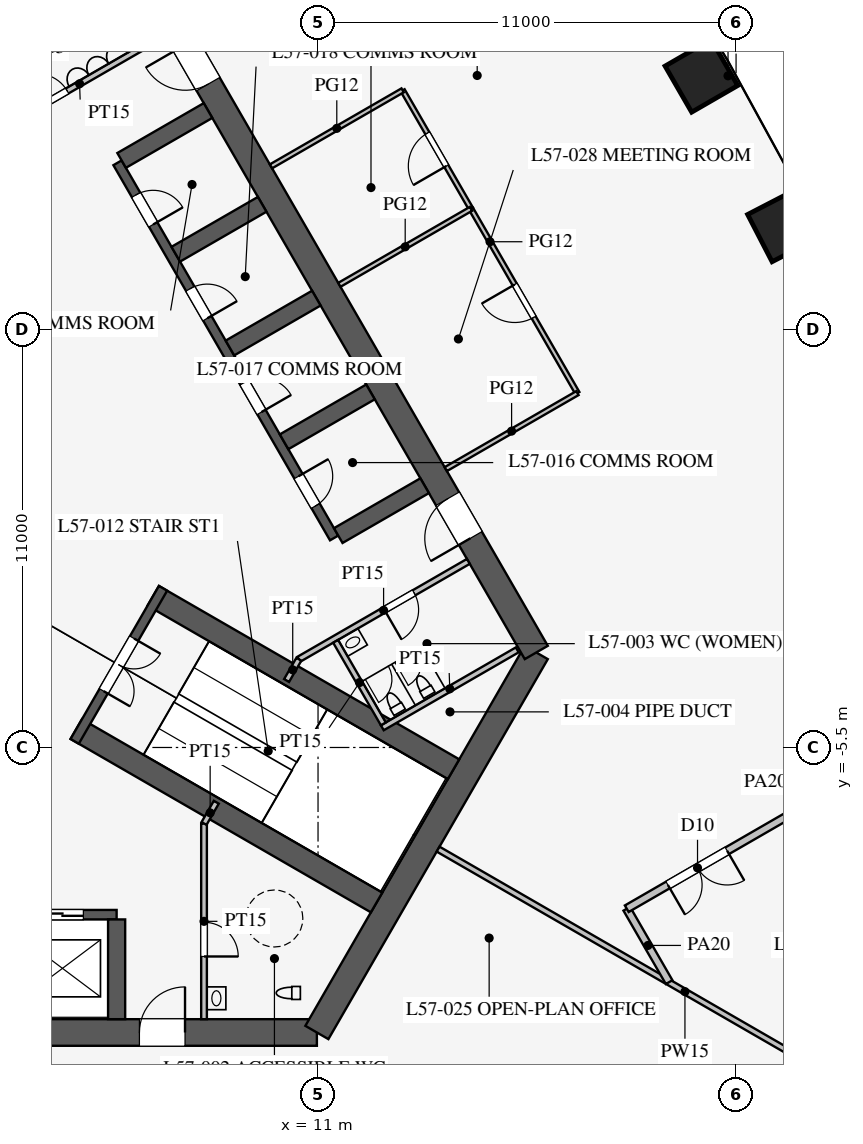
"""IFC4 building model, lengths in metres.
Left out: names, types, materials, properties, quantities, classifications, styles, units other than length and angle.
Written with IfcOpenShell. Run it as: python <this file> out.ifc"""

import sys

from ifc_helpers import new_model, si_unit, direction, frame, frame_2d, origin, origin_2d, place, context, subcontext, project, spatial, rectangle, extrude, element, fill, save


model = new_model("IFC4")
c1 = context("Model", 3, precision=1e-05, world=origin(), true_north=direction((0.0, 1.0)))
c2 = subcontext(c1, "Body", "Model", "MODEL_VIEW")
j1 = project(units=[si_unit("LENGTHUNIT", "METRE"), si_unit("PLANEANGLEUNIT", "RADIAN")], contexts=[c1])
p1 = place(None, origin())
s1 = spatial("IfcSite", under=j1, at=p1, CompositionType="ELEMENT")
p2 = place(p1, origin())
s2 = spatial("IfcBuilding", under=s1, at=p2, CompositionType="ELEMENT")
p3 = place(p2, frame((0.0, 0.0, 248.5)))
s3 = spatial("IfcBuildingStorey", under=s2, at=p3, CompositionType="ELEMENT", Elevation=248.5)
for number, where, z_axis, x_axis in (
    (1, (23.248, 8.226, 0.0), (0.0, 0.0, 1.0), (-0.46, 0.888, 0.0)),
    (2, (21.088, 12.175, 0.0), (0.0, 0.0, 1.0), (-0.5, 0.866, 0.0)),
):
    element("IfcColumn", number, at=place(p3, frame(where, z_axis=z_axis, x_axis=x_axis)), inside=s3, PredefinedType="COLUMN", context=c2, shape_type="SweptSolid", body=[
        extrude(rectangle(XDim=1.4, YDim=1.4, at=origin_2d()), origin(), (0.0, 0.0, 1.0), 4.2),
    ])
p4 = place(p3, frame((-10.97, -13.0, 0.0), z_axis=(0.0, 0.0, 1.0), x_axis=(1.0, 0.0, 0.0)))
e3 = element("IfcWall", 3, at=p4, inside=s3, PredefinedType="SHEAR", context=c2, shape_type="SweptSolid", body=[
    extrude(rectangle(XDim=21.939, YDim=0.7, at=frame_2d((10.97, 0.0))), origin(), (0.0, 0.0, 1.0), 4.2),
])
p5 = place(p4, frame((17.27, 0.0, 0.0)))
e4 = element("IfcOpeningElement", 4, at=p5, cuts=e3, PredefinedType="OPENING", context=c2, shape_type="SweptSolid", body=[
    extrude(rectangle(XDim=1.2, YDim=2.1, at=frame_2d((0.6, 1.05))), frame((0.0, 0.36, 0.0), z_axis=(0.0, -1.0, 0.0), x_axis=(1.0, 0.0, 0.0)), (0.0, 0.0, 1.0), 0.72),
])
p6 = place(p4, frame((3.47, 0.0, 0.0)))
e5 = element("IfcOpeningElement", 5, at=p6, cuts=e3, PredefinedType="OPENING", context=c2, shape_type="SweptSolid", body=[
    extrude(rectangle(XDim=1.2, YDim=2.1, at=frame_2d((0.6, 1.05))), frame((0.0, 0.36, 0.0), z_axis=(0.0, -1.0, 0.0), x_axis=(1.0, 0.0, 0.0)), (0.0, 0.0, 1.0), 0.72),
])
p7 = place(p3, frame((10.97, -13.0, 0.0), z_axis=(0.0, 0.0, 1.0), x_axis=(0.499995765644, 0.866027848477, 0.0)))
e6 = element("IfcWall", 6, at=p7, inside=s3, PredefinedType="SHEAR", context=c2, shape_type="SweptSolid", body=[
    extrude(rectangle(XDim=11.547, YDim=0.7, at=frame_2d((5.773, 0.0))), origin(), (0.0, 0.0, 1.0), 4.2),
])
p8 = place(p3, frame((16.743, -3.0, 0.0), z_axis=(0.0, 0.0, 1.0), x_axis=(-0.500002442456, 0.866023993627, 0.0)))
e7 = element("IfcWall", 7, at=p8, inside=s3, PredefinedType="SHEAR", context=c2, shape_type="SweptSolid", body=[
    extrude(rectangle(XDim=21.939, YDim=0.7, at=frame_2d((10.97, 0.0))), origin(), (0.0, 0.0, 1.0), 4.2),
])
p9 = place(p8, frame((17.27, 0.0, 0.0)))
e8 = element("IfcOpeningElement", 8, at=p9, cuts=e7, PredefinedType="OPENING", context=c2, shape_type="SweptSolid", body=[
    extrude(rectangle(XDim=1.2, YDim=2.1, at=frame_2d((0.6, 1.05))), frame((0.0, 0.36, 0.0), z_axis=(0.0, -1.0, 0.0), x_axis=(1.0, 0.0, 0.0)), (0.0, 0.0, 1.0), 0.72),
])
p10 = place(p8, frame((3.47, 0.0, 0.0)))
e9 = element("IfcOpeningElement", 9, at=p10, cuts=e7, PredefinedType="OPENING", context=c2, shape_type="SweptSolid", body=[
    extrude(rectangle(XDim=1.2, YDim=2.1, at=frame_2d((0.6, 1.05))), frame((0.0, 0.36, 0.0), z_axis=(0.0, -1.0, 0.0), x_axis=(1.0, 0.0, 0.0)), (0.0, 0.0, 1.0), 0.72),
])
p11 = place(p3, frame((-5.7, -9.9, 0.0), z_axis=(0.0, 0.0, 1.0), x_axis=(1.0, 0.0, 0.0)))
e10 = element("IfcWall", 10, at=p11, inside=s3, PredefinedType="SHEAR", context=c2, shape_type="SweptSolid", body=[
    extrude(rectangle(XDim=11.4, YDim=0.25, at=frame_2d((5.7, 0.0))), origin(), (0.0, 0.0, 1.0), 4.2),
])
p12 = place(p11, frame((0.875, 0.0, 0.0)))
e11 = element("IfcOpeningElement", 11, at=p12, cuts=e10, PredefinedType="OPENING", context=c2, shape_type="SweptSolid", body=[
    extrude(rectangle(XDim=1.1, YDim=2.2, at=frame_2d((0.55, 1.1))), frame((0.0, 0.135, 0.0), z_axis=(0.0, -1.0, 0.0), x_axis=(1.0, 0.0, 0.0)), (0.0, 0.0, 1.0), 0.27),
])
p13 = place(p11, frame((3.725, 0.0, 0.0)))
e12 = element("IfcOpeningElement", 12, at=p13, cuts=e10, PredefinedType="OPENING", context=c2, shape_type="SweptSolid", body=[
    extrude(rectangle(XDim=1.1, YDim=2.2, at=frame_2d((0.55, 1.1))), frame((0.0, 0.135, 0.0), z_axis=(0.0, -1.0, 0.0), x_axis=(1.0, 0.0, 0.0)), (0.0, 0.0, 1.0), 0.27),
])
p14 = place(p11, frame((6.575, 0.0, 0.0)))
e13 = element("IfcOpeningElement", 13, at=p14, cuts=e10, PredefinedType="OPENING", context=c2, shape_type="SweptSolid", body=[
    extrude(rectangle(XDim=1.1, YDim=2.2, at=frame_2d((0.55, 1.1))), frame((0.0, 0.135, 0.0), z_axis=(0.0, -1.0, 0.0), x_axis=(1.0, 0.0, 0.0)), (0.0, 0.0, 1.0), 0.27),
])
p15 = place(p11, frame((9.425, 0.0, 0.0)))
e14 = element("IfcOpeningElement", 14, at=p15, cuts=e10, PredefinedType="OPENING", context=c2, shape_type="SweptSolid", body=[
    extrude(rectangle(XDim=1.1, YDim=2.2, at=frame_2d((0.55, 1.1))), frame((0.0, 0.135, 0.0), z_axis=(0.0, -1.0, 0.0), x_axis=(1.0, 0.0, 0.0)), (0.0, 0.0, 1.0), 0.27),
])
p16 = place(p3, frame((5.7, -10.025, 0.0), z_axis=(0.0, 0.0, 1.0), x_axis=(0.0, -1.0, 0.0)))
e15 = element("IfcWall", 15, at=p16, inside=s3, PredefinedType="SHEAR", context=c2, shape_type="SweptSolid", body=[
    extrude(rectangle(XDim=2.625, YDim=0.45, at=frame_2d((1.312, 0.0))), origin(), (0.0, 0.0, 1.0), 4.2),
])
p17 = place(p3, frame((11.424, 0.014, 0.0), z_axis=(0.0, 0.0, 1.0), x_axis=(-0.500001763848, 0.866024385424, 0.0)))
e16 = element("IfcWall", 16, at=p17, inside=s3, PredefinedType="SHEAR", context=c2, shape_type="SweptSolid", body=[
    extrude(rectangle(XDim=11.4, YDim=0.25, at=frame_2d((5.7, 0.0))), origin(), (0.0, 0.0, 1.0), 4.2),
])
p18 = place(p17, frame((0.975, 0.0, 0.0)))
e17 = element("IfcOpeningElement", 17, at=p18, cuts=e16, PredefinedType="OPENING", context=c2, shape_type="SweptSolid", body=[
    extrude(rectangle(XDim=0.9, YDim=2.1, at=frame_2d((0.45, 1.05))), frame((0.0, 0.135, 0.0), z_axis=(0.0, -1.0, 0.0), x_axis=(1.0, 0.0, 0.0)), (0.0, 0.0, 1.0), 0.27),
])
p19 = place(p17, frame((3.825, 0.0, 0.0)))
e18 = element("IfcOpeningElement", 18, at=p19, cuts=e16, PredefinedType="OPENING", context=c2, shape_type="SweptSolid", body=[
    extrude(rectangle(XDim=0.9, YDim=2.1, at=frame_2d((0.45, 1.05))), frame((0.0, 0.135, 0.0), z_axis=(0.0, -1.0, 0.0), x_axis=(1.0, 0.0, 0.0)), (0.0, 0.0, 1.0), 0.27),
])
p20 = place(p17, frame((6.675, 0.0, 0.0)))
e19 = element("IfcOpeningElement", 19, at=p20, cuts=e16, PredefinedType="OPENING", context=c2, shape_type="SweptSolid", body=[
    extrude(rectangle(XDim=0.9, YDim=2.1, at=frame_2d((0.45, 1.05))), frame((0.0, 0.135, 0.0), z_axis=(0.0, -1.0, 0.0), x_axis=(1.0, 0.0, 0.0)), (0.0, 0.0, 1.0), 0.27),
])
p21 = place(p17, frame((9.525, 0.0, 0.0)))
e20 = element("IfcOpeningElement", 20, at=p21, cuts=e16, PredefinedType="OPENING", context=c2, shape_type="SweptSolid", body=[
    extrude(rectangle(XDim=0.9, YDim=2.1, at=frame_2d((0.45, 1.05))), frame((0.0, 0.135, 0.0), z_axis=(0.0, -1.0, 0.0), x_axis=(1.0, 0.0, 0.0)), (0.0, 0.0, 1.0), 0.27),
])
for number, where, z_axis, x_axis in (
    (21, (11.532, 0.076, 0.0), (0.0, 0.0, 1.0), (0.866, 0.5, 0.0)),
    (22, (10.107, 2.544, 0.0), (0.0, 0.0, 1.0), (0.866, 0.5, 0.0)),
    (23, (8.682, 5.012, 0.0), (0.0, 0.0, 1.0), (0.866, 0.5, 0.0)),
    (24, (7.257, 7.481, 0.0), (0.0, 0.0, 1.0), (0.866, 0.5, 0.0)),
    (25, (5.832, 9.949, 0.0), (0.0, 0.0, 1.0), (0.866, 0.5, 0.0)),
):
    element("IfcWall", number, at=place(p3, frame(where, z_axis=z_axis, x_axis=x_axis)), inside=s3, PredefinedType="SHEAR", context=c2, shape_type="SweptSolid", body=[
        extrude(rectangle(XDim=2.625, YDim=0.45, at=frame_2d((1.312, 0.0))), origin(), (0.0, 0.0, 1.0), 4.2),
    ])
for number, where, z_axis, x_axis in (
    (26, (4.638, -5.016, 0.0), (0.0, 0.0, 1.0), (0.866, -0.5, 0.0)),
    (27, (6.663, -1.509, 0.0), (0.0, 0.0, 1.0), (0.866, -0.5, 0.0)),
):
    element("IfcWall", number, at=place(p3, frame(where, z_axis=z_axis, x_axis=x_axis)), inside=s3, PredefinedType="SHEAR", context=c2, shape_type="SweptSolid", body=[
        extrude(rectangle(XDim=9.125, YDim=0.6, at=frame_2d((4.562, 0.0))), origin(), (0.0, 0.0, 1.0), 4.2),
    ])
p22 = place(p3, frame((4.597, -5.339, 0.0), z_axis=(0.0, 0.0, 1.0), x_axis=(0.499984536904, 0.866034331223, 0.0)))
e28 = element("IfcWall", 28, at=p22, inside=s3, PredefinedType="SHEAR", context=c2, shape_type="SweptSolid", body=[
    extrude(rectangle(XDim=4.65, YDim=0.25, at=frame_2d((2.325, 0.0))), origin(), (0.0, 0.0, 1.0), 4.2),
])
p23 = place(p22, frame((1.525, 0.0, 0.0)))
e29 = element("IfcOpeningElement", 29, at=p23, cuts=e28, PredefinedType="OPENING", context=c2, shape_type="SweptSolid", body=[
    extrude(rectangle(XDim=1.6, YDim=2.1, at=frame_2d((0.8, 1.05))), frame((0.0, 0.135, 0.0), z_axis=(0.0, -1.0, 0.0), x_axis=(1.0, 0.0, 0.0)), (0.0, 0.0, 1.0), 0.27),
])
p24 = place(p3, frame((8.0, -7.5, 0.0), z_axis=(0.0, 0.0, 1.0), x_axis=(0.0, -1.0, 0.0)))
e30 = element("IfcWall", 30, at=p24, inside=s3, PredefinedType="PARTITIONING", context=c2, shape_type="SweptSolid", body=[
    extrude(rectangle(XDim=5.15, YDim=0.15, at=frame_2d((2.575, 0.0))), origin(), (0.0, 0.0, 1.0), 4.0),
])
p25 = place(p24, frame((2.6, 0.0, 0.0)))
e31 = element("IfcOpeningElement", 31, at=p25, cuts=e30, PredefinedType="OPENING", context=c2, shape_type="SweptSolid", body=[
    extrude(rectangle(XDim=0.9, YDim=2.1, at=frame_2d((0.45, 1.05))), frame((0.0, 0.085, 0.0), z_axis=(0.0, -1.0, 0.0), x_axis=(1.0, 0.0, 0.0)), (0.0, 0.0, 1.0), 0.17),
])
p26 = place(p3, frame((2.495, 10.678, 0.0), z_axis=(0.0, 0.0, 1.0), x_axis=(0.866037967349, 0.499978238636, 0.0)))
e32 = element("IfcWall", 32, at=p26, inside=s3, PredefinedType="PARTITIONING", context=c2, shape_type="SweptSolid", body=[
    extrude(rectangle(XDim=5.15, YDim=0.15, at=frame_2d((2.575, 0.0))), origin(), (0.0, 0.0, 1.0), 4.0),
])
p27 = place(p26, frame((1.3, 0.0, 0.0)))
e33 = element("IfcOpeningElement", 33, at=p27, cuts=e32, PredefinedType="OPENING", context=c2, shape_type="SweptSolid", body=[
    extrude(rectangle(XDim=0.9, YDim=2.1, at=frame_2d((0.45, 1.05))), frame((0.0, 0.085, 0.0), z_axis=(0.0, -1.0, 0.0), x_axis=(1.0, 0.0, 0.0)), (0.0, 0.0, 1.0), 0.17),
])
p28 = place(p3, frame((10.495, -3.178, 0.0), z_axis=(0.0, 0.0, 1.0), x_axis=(0.866037967349, 0.499978238636, 0.0)))
e34 = element("IfcWall", 34, at=p28, inside=s3, PredefinedType="PARTITIONING", context=c2, shape_type="SweptSolid", body=[
    extrude(rectangle(XDim=5.15, YDim=0.15, at=frame_2d((2.575, 0.0))), origin(), (0.0, 0.0, 1.0), 4.0),
])
p29 = place(p28, frame((2.6, 0.0, 0.0)))
e35 = element("IfcOpeningElement", 35, at=p29, cuts=e34, PredefinedType="OPENING", context=c2, shape_type="SweptSolid", body=[
    extrude(rectangle(XDim=0.9, YDim=2.1, at=frame_2d((0.45, 1.05))), frame((0.0, 0.085, 0.0), z_axis=(0.0, -1.0, 0.0), x_axis=(1.0, 0.0, 0.0)), (0.0, 0.0, 1.0), 0.17),
])
for number, where, z_axis, x_axis in (
    (36, (8.0, -7.5, 0.0), (0.0, 0.0, 1.0), (0.5, 0.866, 0.0)),
    (37, (10.495, -3.178, 0.0), (0.0, 0.0, 1.0), (-0.5, -0.866, 0.0)),
):
    element("IfcWall", number, at=place(p3, frame(where, z_axis=z_axis, x_axis=x_axis)), inside=s3, PredefinedType="PARTITIONING", context=c2, shape_type="SweptSolid", body=[
        extrude(rectangle(XDim=0.645, YDim=0.15, at=frame_2d((0.323, 0.0))), origin(), (0.0, 0.0, 1.0), 4.0),
    ])
p30 = place(p3, frame((12.691, -4.982, 0.0), z_axis=(0.0, 0.0, 1.0), x_axis=(0.8660249478, 0.500000789788, 0.0)))
e38 = element("IfcWall", 38, at=p30, inside=s3, PredefinedType="PARTITIONING", context=c2, shape_type="SweptSolid", body=[
    extrude(rectangle(XDim=4.1, YDim=0.15, at=frame_2d((2.05, 0.0))), origin(), (0.0, 0.0, 1.0), 4.0),
])
p31 = place(p3, frame((11.464, -2.706, 0.0), z_axis=(0.0, 0.0, 1.0), x_axis=(0.50001992892, -0.866013897511, 0.0)))
e39 = element("IfcWall", 39, at=p31, inside=s3, PredefinedType="PARTITIONING", context=c2, shape_type="SweptSolid", body=[
    extrude(rectangle(XDim=2.51, YDim=0.15, at=frame_2d((1.255, 0.0))), origin(), (0.0, 0.0, 1.0), 4.0),
])
p32 = place(p3, frame((14.159, -8.175, 0.0), z_axis=(0.0, 0.0, 1.0), x_axis=(0.866027028085, -0.499997186618, 0.0)))
e40 = element("IfcWall", 40, at=p32, inside=s3, PredefinedType="PARTITIONING", context=c2, shape_type="SweptSolid", body=[
    extrude(rectangle(XDim=15.0, YDim=0.15, at=frame_2d((7.5, 0.0))), origin(), (0.0, 0.0, 1.0), 2.4),
])
p33 = place(p3, frame((19.124, -9.743, 0.0), z_axis=(0.0, 0.0, 1.0), x_axis=(0.500047783504, -0.865997814208, 0.0)))
e41 = element("IfcWall", 41, at=p33, inside=s3, PredefinedType="PARTITIONING", context=c2, shape_type="SweptSolid", body=[
    extrude(rectangle(XDim=2.23, YDim=0.2, at=frame_2d((1.115, 0.0))), origin(), (0.0, 0.0, 1.0), 2.9),
])
p34 = place(p3, frame((15.026, 8.675, 0.0), z_axis=(0.0, 0.0, 1.0), x_axis=(-0.500012057535, 0.866018442252, 0.0)))
e42 = element("IfcWall", 42, at=p34, inside=s3, PredefinedType="PARTITIONING", context=c2, shape_type="SweptSolid", body=[
    extrude(rectangle(XDim=3.6, YDim=0.12, at=frame_2d((1.8, 0.0))), origin(), (0.0, 0.0, 1.0), 2.9),
])
p35 = place(p34, frame((1.3, 0.0, 0.15)))
e43 = element("IfcOpeningElement", 43, at=p35, cuts=e42, PredefinedType="OPENING", context=c2, shape_type="SweptSolid", body=[
    extrude(rectangle(XDim=1.0, YDim=2.1, at=frame_2d((0.5, 1.05))), frame((0.0, 0.07, 0.0), z_axis=(0.0, -1.0, 0.0), x_axis=(1.0, 0.0, 0.0)), (0.0, 0.0, 1.0), 0.14),
])
p36 = place(p3, frame((17.825, 3.825, 0.0), z_axis=(0.0, 0.0, 1.0), x_axis=(-0.499965239061, 0.866045472092, 0.0)))
e44 = element("IfcWall", 44, at=p36, inside=s3, PredefinedType="PARTITIONING", context=c2, shape_type="SweptSolid", body=[
    extrude(rectangle(XDim=5.6, YDim=0.12, at=frame_2d((2.8, 0.0))), origin(), (0.0, 0.0, 1.0), 2.9),
])
p37 = place(p36, frame((2.3, 0.0, 0.15)))
e45 = element("IfcOpeningElement", 45, at=p37, cuts=e44, PredefinedType="OPENING", context=c2, shape_type="SweptSolid", body=[
    extrude(rectangle(XDim=1.0, YDim=2.1, at=frame_2d((0.5, 1.05))), frame((0.0, 0.07, 0.0), z_axis=(0.0, -1.0, 0.0), x_axis=(1.0, 0.0, 0.0)), (0.0, 0.0, 1.0), 0.14),
])
for number, where, z_axis, x_axis in (
    (46, (9.761, 9.793, 0.0), (0.0, 0.0, 1.0), (0.866, 0.5, 0.0)),
    (47, (11.562, 6.675, 0.0), (0.0, 0.0, 1.0), (0.866, 0.5, 0.0)),
    (48, (14.361, 1.825, 0.0), (0.0, 0.0, 1.0), (0.866, 0.5, 0.0)),
):
    element("IfcWall", number, at=place(p3, frame(where, z_axis=z_axis, x_axis=x_axis)), inside=s3, PredefinedType="PARTITIONING", context=c2, shape_type="SweptSolid", body=[
        extrude(rectangle(XDim=4.0, YDim=0.12, at=frame_2d((2.0, 0.0))), origin(), (0.0, 0.0, 1.0), 2.9),
    ])
p38 = place(p3, frame((19.124, -9.743, 0.0), z_axis=(0.0, 0.0, 1.0), x_axis=(0.866033076574, 0.499986710104, 0.0)))
e49 = element("IfcWall", 49, at=p38, inside=s3, PredefinedType="PARTITIONING", context=c2, shape_type="SweptSolid", body=[
    extrude(rectangle(XDim=10.237, YDim=0.2, at=frame_2d((5.118, 0.0))), origin(), (0.0, 0.0, 1.0), 2.8),
])
p39 = place(p38, frame((1.25, 0.0, 0.15)))
e50 = element("IfcOpeningElement", 50, at=p39, cuts=e49, PredefinedType="OPENING", context=c2, shape_type="SweptSolid", body=[
    extrude(rectangle(XDim=1.8, YDim=2.1, at=frame_2d((0.9, 1.05))), frame((0.0, 0.11, 0.0), z_axis=(0.0, -1.0, 0.0), x_axis=(1.0, 0.0, 0.0)), (0.0, 0.0, 1.0), 0.22),
])
p40 = place(p25, origin())
e51 = element("IfcDoor", 51, at=p40, inside=s3, OperationType="SINGLE_SWING_RIGHT", PredefinedType="DOOR", context=c2, shape_type="SweptSolid", body=[
    extrude(rectangle(XDim=0.9, YDim=2.1, at=frame_2d((0.45, 1.05))), frame((0.0, 0.025, 0.0), z_axis=(0.0, -1.0, 0.0), x_axis=(1.0, 0.0, 0.0)), (0.0, 0.0, 1.0), 0.05),
])
fill(e31, e51)
p41 = place(p27, origin())
e52 = element("IfcDoor", 52, at=p41, inside=s3, OperationType="SINGLE_SWING_LEFT", PredefinedType="DOOR", context=c2, shape_type="SweptSolid", body=[
    extrude(rectangle(XDim=0.9, YDim=2.1, at=frame_2d((0.45, 1.05))), frame((0.0, 0.025, 0.0), z_axis=(0.0, -1.0, 0.0), x_axis=(1.0, 0.0, 0.0)), (0.0, 0.0, 1.0), 0.05),
])
fill(e33, e52)
p42 = place(p29, frame((0.9, 0.0, 0.0), z_axis=(0.0, 0.0, 1.0), x_axis=(-1.0, 0.0, 0.0)))
e53 = element("IfcDoor", 53, at=p42, inside=s3, OperationType="SINGLE_SWING_RIGHT", PredefinedType="DOOR", context=c2, shape_type="SweptSolid", body=[
    extrude(rectangle(XDim=0.9, YDim=2.1, at=frame_2d((0.45, 1.05))), frame((0.0, 0.025, 0.0), z_axis=(0.0, -1.0, 0.0), x_axis=(1.0, 0.0, 0.0)), (0.0, 0.0, 1.0), 0.05),
])
fill(e35, e53)
p43 = place(p23, frame((1.6, 0.0, 0.0), z_axis=(0.0, 0.0, 1.0), x_axis=(-1.0, 0.0, 0.0)))
e54 = element("IfcDoor", 54, at=p43, inside=s3, OperationType="DOUBLE_DOOR_SINGLE_SWING", PredefinedType="DOOR", context=c2, shape_type="SweptSolid", body=[
    extrude(rectangle(XDim=1.6, YDim=2.1, at=frame_2d((0.8, 1.05))), frame((0.0, 0.025, 0.0), z_axis=(0.0, -1.0, 0.0), x_axis=(1.0, 0.0, 0.0)), (0.0, 0.0, 1.0), 0.05),
])
fill(e29, e54)
p44 = place(p5, origin())
e55 = element("IfcDoor", 55, at=p44, inside=s3, OperationType="SINGLE_SWING_RIGHT", PredefinedType="DOOR", context=c2, shape_type="SweptSolid", body=[
    extrude(rectangle(XDim=1.2, YDim=2.1, at=frame_2d((0.6, 1.05))), frame((0.0, 0.025, 0.0), z_axis=(0.0, -1.0, 0.0), x_axis=(1.0, 0.0, 0.0)), (0.0, 0.0, 1.0), 0.05),
])
fill(e4, e55)
p45 = place(p9, origin())
e56 = element("IfcDoor", 56, at=p45, inside=s3, OperationType="SINGLE_SWING_RIGHT", PredefinedType="DOOR", context=c2, shape_type="SweptSolid", body=[
    extrude(rectangle(XDim=1.2, YDim=2.1, at=frame_2d((0.6, 1.05))), frame((0.0, 0.025, 0.0), z_axis=(0.0, -1.0, 0.0), x_axis=(1.0, 0.0, 0.0)), (0.0, 0.0, 1.0), 0.05),
])
fill(e8, e56)
p46 = place(p10, origin())
e57 = element("IfcDoor", 57, at=p46, inside=s3, OperationType="SINGLE_SWING_LEFT", PredefinedType="DOOR", context=c2, shape_type="SweptSolid", body=[
    extrude(rectangle(XDim=1.2, YDim=2.1, at=frame_2d((0.6, 1.05))), frame((0.0, 0.025, 0.0), z_axis=(0.0, -1.0, 0.0), x_axis=(1.0, 0.0, 0.0)), (0.0, 0.0, 1.0), 0.05),
])
fill(e9, e57)
p47 = place(p18, frame((0.9, 0.0, 0.0), z_axis=(0.0, 0.0, 1.0), x_axis=(-1.0, 0.0, 0.0)))
e58 = element("IfcDoor", 58, at=p47, inside=s3, OperationType="SINGLE_SWING_LEFT", PredefinedType="DOOR", context=c2, shape_type="SweptSolid", body=[
    extrude(rectangle(XDim=0.9, YDim=2.1, at=frame_2d((0.45, 1.05))), frame((0.0, 0.025, 0.0), z_axis=(0.0, -1.0, 0.0), x_axis=(1.0, 0.0, 0.0)), (0.0, 0.0, 1.0), 0.05),
])
fill(e17, e58)
p48 = place(p19, frame((0.9, 0.0, 0.0), z_axis=(0.0, 0.0, 1.0), x_axis=(-1.0, 0.0, 0.0)))
e59 = element("IfcDoor", 59, at=p48, inside=s3, OperationType="SINGLE_SWING_RIGHT", PredefinedType="DOOR", context=c2, shape_type="SweptSolid", body=[
    extrude(rectangle(XDim=0.9, YDim=2.1, at=frame_2d((0.45, 1.05))), frame((0.0, 0.025, 0.0), z_axis=(0.0, -1.0, 0.0), x_axis=(1.0, 0.0, 0.0)), (0.0, 0.0, 1.0), 0.05),
])
fill(e18, e59)
p49 = place(p20, frame((0.9, 0.0, 0.0), z_axis=(0.0, 0.0, 1.0), x_axis=(-1.0, 0.0, 0.0)))
e60 = element("IfcDoor", 60, at=p49, inside=s3, OperationType="SINGLE_SWING_RIGHT", PredefinedType="DOOR", context=c2, shape_type="SweptSolid", body=[
    extrude(rectangle(XDim=0.9, YDim=2.1, at=frame_2d((0.45, 1.05))), frame((0.0, 0.025, 0.0), z_axis=(0.0, -1.0, 0.0), x_axis=(1.0, 0.0, 0.0)), (0.0, 0.0, 1.0), 0.05),
])
fill(e19, e60)
p50 = place(p21, frame((0.9, 0.0, 0.0), z_axis=(0.0, 0.0, 1.0), x_axis=(-1.0, 0.0, 0.0)))
e61 = element("IfcDoor", 61, at=p50, inside=s3, OperationType="SINGLE_SWING_RIGHT", PredefinedType="DOOR", context=c2, shape_type="SweptSolid", body=[
    extrude(rectangle(XDim=0.9, YDim=2.1, at=frame_2d((0.45, 1.05))), frame((0.0, 0.025, 0.0), z_axis=(0.0, -1.0, 0.0), x_axis=(1.0, 0.0, 0.0)), (0.0, 0.0, 1.0), 0.05),
])
fill(e20, e61)
p51 = place(p39, frame((1.8, 0.0, 0.0), z_axis=(0.0, 0.0, 1.0), x_axis=(-1.0, 0.0, 0.0)))
e62 = element("IfcDoor", 62, at=p51, inside=s3, OperationType="DOUBLE_DOOR_SINGLE_SWING", PredefinedType="DOOR", context=c2, shape_type="SweptSolid", body=[
    extrude(rectangle(XDim=1.8, YDim=2.1, at=frame_2d((0.9, 1.05))), frame((0.0, 0.025, 0.0), z_axis=(0.0, -1.0, 0.0), x_axis=(1.0, 0.0, 0.0)), (0.0, 0.0, 1.0), 0.05),
])
fill(e50, e62)
p52 = place(p37, origin())
e63 = element("IfcDoor", 63, at=p52, inside=s3, OperationType="SINGLE_SWING_RIGHT", PredefinedType="DOOR", context=c2, shape_type="SweptSolid", body=[
    extrude(rectangle(XDim=1.0, YDim=2.1, at=frame_2d((0.5, 1.05))), frame((0.0, 0.025, 0.0), z_axis=(0.0, -1.0, 0.0), x_axis=(1.0, 0.0, 0.0)), (0.0, 0.0, 1.0), 0.05),
])
fill(e45, e63)
p53 = place(p35, origin())
e64 = element("IfcDoor", 64, at=p53, inside=s3, OperationType="SINGLE_SWING_LEFT", PredefinedType="DOOR", context=c2, shape_type="SweptSolid", body=[
    extrude(rectangle(XDim=1.0, YDim=2.1, at=frame_2d((0.5, 1.05))), frame((0.0, 0.025, 0.0), z_axis=(0.0, -1.0, 0.0), x_axis=(1.0, 0.0, 0.0)), (0.0, 0.0, 1.0), 0.05),
])
fill(e43, e64)
p54 = place(p15, origin())
e65 = element("IfcDoor", 65, at=p54, inside=s3, OperationType="DOUBLE_DOOR_SLIDING", PredefinedType="DOOR", context=c2, shape_type="SweptSolid", body=[
    extrude(rectangle(XDim=1.1, YDim=2.2, at=frame_2d((0.55, 1.1))), frame((0.0, 0.025, 0.0), z_axis=(0.0, -1.0, 0.0), x_axis=(1.0, 0.0, 0.0)), (0.0, 0.0, 1.0), 0.05),
])
fill(e14, e65)
save(model, sys.argv[1])
